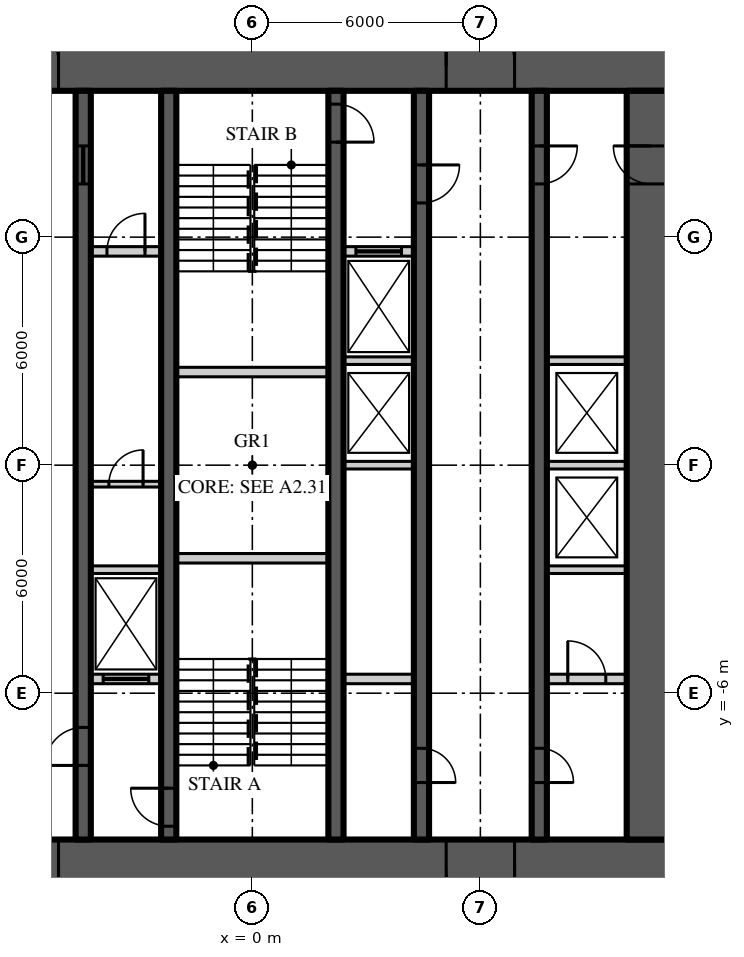
"""IFC4 building model, lengths in metres.
Left out: names, types, materials, properties, quantities, classifications, styles, units other than length and angle.
Written with IfcOpenShell. Run it as: python <this file> out.ifc"""

import sys

from ifc_helpers import new_model, si_unit, direction, frame, frame_2d, origin, place, context, subcontext, project, spatial, rectangle, extrude, element, fill, save


model = new_model("IFC4")
c1 = context("Model", 3, precision=1e-05, world=origin(), true_north=direction((0.0, 1.0)))
c2 = subcontext(c1, "Body", "Model", "MODEL_VIEW")
j1 = project(units=[si_unit("LENGTHUNIT", "METRE"), si_unit("PLANEANGLEUNIT", "RADIAN")], contexts=[c1])
p1 = place(None, origin())
s1 = spatial("IfcSite", under=j1, at=p1, CompositionType="ELEMENT")
p2 = place(p1, origin())
s2 = spatial("IfcBuilding", under=s1, at=p2, CompositionType="ELEMENT")
p3 = place(p2, frame((0.0, 0.0, 232.2)))
s3 = spatial("IfcBuildingStorey", under=s2, at=p3, CompositionType="ELEMENT", Elevation=232.2)
p4 = place(p3, frame((-11.15, 10.5, 0.0), z_axis=(0.0, 0.0, 1.0), x_axis=(1.0, 0.0, 0.0)))
e1 = element("IfcWall", 1, at=p4, inside=s3, PredefinedType="SHEAR", context=c2, shape_type="SweptSolid", body=[
    extrude(rectangle(XDim=22.3, YDim=1.3, at=frame_2d((11.15, 0.0))), origin(), (0.0, 0.0, 1.0), 3.9),
])
p5 = place(p4, frame((4.25, 0.0, 0.0)))
e2 = element("IfcOpeningElement", 2, at=p5, cuts=e1, PredefinedType="OPENING", context=c2, shape_type="SweptSolid", body=[
    extrude(rectangle(XDim=1.8, YDim=2.2, at=frame_2d((0.9, 1.1))), frame((0.0, 0.66, 0.0), z_axis=(0.0, -1.0, 0.0), x_axis=(1.0, 0.0, 0.0)), (0.0, 0.0, 1.0), 1.32),
])
p6 = place(p4, frame((16.25, 0.0, 0.0)))
e3 = element("IfcOpeningElement", 3, at=p6, cuts=e1, PredefinedType="OPENING", context=c2, shape_type="SweptSolid", body=[
    extrude(rectangle(XDim=1.8, YDim=2.2, at=frame_2d((0.9, 1.1))), frame((0.0, 0.66, 0.0), z_axis=(0.0, -1.0, 0.0), x_axis=(1.0, 0.0, 0.0)), (0.0, 0.0, 1.0), 1.32),
])
p7 = place(p3, frame((11.15, -10.5, 0.0), z_axis=(0.0, 0.0, 1.0), x_axis=(-1.0, 0.0, 0.0)))
e4 = element("IfcWall", 4, at=p7, inside=s3, PredefinedType="SHEAR", context=c2, shape_type="SweptSolid", body=[
    extrude(rectangle(XDim=22.3, YDim=1.3, at=frame_2d((11.15, 0.0))), origin(), (0.0, 0.0, 1.0), 3.9),
])
p8 = place(p7, frame((16.25, 0.0, 0.0)))
e5 = element("IfcOpeningElement", 5, at=p8, cuts=e4, PredefinedType="OPENING", context=c2, shape_type="SweptSolid", body=[
    extrude(rectangle(XDim=1.8, YDim=2.2, at=frame_2d((0.9, 1.1))), frame((0.0, 0.66, 0.0), z_axis=(0.0, -1.0, 0.0), x_axis=(1.0, 0.0, 0.0)), (0.0, 0.0, 1.0), 1.32),
])
p9 = place(p7, frame((4.25, 0.0, 0.0)))
e6 = element("IfcOpeningElement", 6, at=p9, cuts=e4, PredefinedType="OPENING", context=c2, shape_type="SweptSolid", body=[
    extrude(rectangle(XDim=1.8, YDim=2.2, at=frame_2d((0.9, 1.1))), frame((0.0, 0.66, 0.0), z_axis=(0.0, -1.0, 0.0), x_axis=(1.0, 0.0, 0.0)), (0.0, 0.0, 1.0), 1.32),
])
p10 = place(p3, frame((10.5, -9.85, 0.0), z_axis=(0.0, 0.0, 1.0), x_axis=(0.0, 1.0, 0.0)))
e7 = element("IfcWall", 7, at=p10, inside=s3, PredefinedType="SHEAR", context=c2, shape_type="SweptSolid", body=[
    extrude(rectangle(XDim=19.7, YDim=1.3, at=frame_2d((9.85, 0.0))), origin(), (0.0, 0.0, 1.0), 3.9),
])
p11 = place(p10, frame((17.25, 0.0, 0.0)))
e8 = element("IfcOpeningElement", 8, at=p11, cuts=e7, PredefinedType="OPENING", context=c2, shape_type="SweptSolid", body=[
    extrude(rectangle(XDim=1.0, YDim=2.2, at=frame_2d((0.5, 1.1))), frame((0.0, 0.66, 0.0), z_axis=(0.0, -1.0, 0.0), x_axis=(1.0, 0.0, 0.0)), (0.0, 0.0, 1.0), 1.32),
])
p12 = place(p3, frame((7.55, 9.85, 0.0), z_axis=(0.0, 0.0, 1.0), x_axis=(0.0, -1.0, 0.0)))
e9 = element("IfcWall", 9, at=p12, inside=s3, PredefinedType="SHEAR", context=c2, shape_type="SweptSolid", body=[
    extrude(rectangle(XDim=19.7, YDim=0.4, at=frame_2d((9.85, 0.0))), origin(), (0.0, 0.0, 1.0), 3.9),
])
p13 = place(p12, frame((1.45, 0.0, 0.0)))
e10 = element("IfcOpeningElement", 10, at=p13, cuts=e9, PredefinedType="OPENING", context=c2, shape_type="SweptSolid", body=[
    extrude(rectangle(XDim=1.0, YDim=2.2, at=frame_2d((0.5, 1.1))), frame((0.0, 0.21, 0.0), z_axis=(0.0, -1.0, 0.0), x_axis=(1.0, 0.0, 0.0)), (0.0, 0.0, 1.0), 0.42),
])
p14 = place(p12, frame((17.3, 0.0, 0.0)))
e11 = element("IfcOpeningElement", 11, at=p14, cuts=e9, PredefinedType="OPENING", context=c2, shape_type="SweptSolid", body=[
    extrude(rectangle(XDim=0.9, YDim=2.1, at=frame_2d((0.45, 1.05))), frame((0.0, 0.21, 0.0), z_axis=(0.0, -1.0, 0.0), x_axis=(1.0, 0.0, 0.0)), (0.0, 0.0, 1.0), 0.42),
])
p15 = place(p3, frame((-4.45, -9.85, 0.0), z_axis=(0.0, 0.0, 1.0), x_axis=(0.0, 1.0, 0.0)))
e12 = element("IfcWall", 12, at=p15, inside=s3, PredefinedType="SHEAR", context=c2, shape_type="SweptSolid", body=[
    extrude(rectangle(XDim=19.7, YDim=0.4, at=frame_2d((9.85, 0.0))), origin(), (0.0, 0.0, 1.0), 3.9),
])
p16 = place(p15, frame((1.95, 0.0, 0.0)))
e13 = element("IfcOpeningElement", 13, at=p16, cuts=e12, PredefinedType="OPENING", context=c2, shape_type="SweptSolid", body=[
    extrude(rectangle(XDim=1.0, YDim=2.2, at=frame_2d((0.5, 1.1))), frame((0.0, 0.21, 0.0), z_axis=(0.0, -1.0, 0.0), x_axis=(1.0, 0.0, 0.0)), (0.0, 0.0, 1.0), 0.42),
])
p17 = place(p15, frame((17.25, 0.0, 0.0)))
e14 = element("IfcOpeningElement", 14, at=p17, cuts=e12, PredefinedType="OPENING", context=c2, shape_type="SweptSolid", body=[
    extrude(rectangle(XDim=1.0, YDim=2.1, at=frame_2d((0.5, 1.05))), frame((0.0, 0.21, 0.0), z_axis=(0.0, -1.0, 0.0), x_axis=(1.0, 0.0, 0.0)), (0.0, 0.0, 1.0), 0.42),
])
p18 = place(p3, frame((4.45, 9.85, 0.0), z_axis=(0.0, 0.0, 1.0), x_axis=(0.0, -1.0, 0.0)))
e15 = element("IfcWall", 15, at=p18, inside=s3, PredefinedType="SHEAR", context=c2, shape_type="SweptSolid", body=[
    extrude(rectangle(XDim=19.7, YDim=0.4, at=frame_2d((9.85, 0.0))), origin(), (0.0, 0.0, 1.0), 3.9),
])
p19 = place(p18, frame((1.95, 0.0, 0.0)))
e16 = element("IfcOpeningElement", 16, at=p19, cuts=e15, PredefinedType="OPENING", context=c2, shape_type="SweptSolid", body=[
    extrude(rectangle(XDim=1.0, YDim=2.2, at=frame_2d((0.5, 1.1))), frame((0.0, 0.21, 0.0), z_axis=(0.0, -1.0, 0.0), x_axis=(1.0, 0.0, 0.0)), (0.0, 0.0, 1.0), 0.42),
])
p20 = place(p18, frame((17.3, 0.0, 0.0)))
e17 = element("IfcOpeningElement", 17, at=p20, cuts=e15, PredefinedType="OPENING", context=c2, shape_type="SweptSolid", body=[
    extrude(rectangle(XDim=0.9, YDim=2.1, at=frame_2d((0.45, 1.05))), frame((0.0, 0.21, 0.0), z_axis=(0.0, -1.0, 0.0), x_axis=(1.0, 0.0, 0.0)), (0.0, 0.0, 1.0), 0.42),
])
p21 = place(p3, frame((-2.2, -9.85, 0.0), z_axis=(0.0, 0.0, 1.0), x_axis=(0.0, 1.0, 0.0)))
e18 = element("IfcWall", 18, at=p21, inside=s3, PredefinedType="SHEAR", context=c2, shape_type="SweptSolid", body=[
    extrude(rectangle(XDim=19.7, YDim=0.4, at=frame_2d((9.85, 0.0))), origin(), (0.0, 0.0, 1.0), 3.9),
])
p22 = place(p21, frame((0.35, 0.0, 0.0)))
e19 = element("IfcOpeningElement", 19, at=p22, cuts=e18, PredefinedType="OPENING", context=c2, shape_type="SweptSolid", body=[
    extrude(rectangle(XDim=1.0, YDim=2.2, at=frame_2d((0.5, 1.1))), frame((0.0, 0.21, 0.0), z_axis=(0.0, -1.0, 0.0), x_axis=(1.0, 0.0, 0.0)), (0.0, 0.0, 1.0), 0.42),
])
p23 = place(p3, frame((2.2, 9.85, 0.0), z_axis=(0.0, 0.0, 1.0), x_axis=(0.0, -1.0, 0.0)))
e20 = element("IfcWall", 20, at=p23, inside=s3, PredefinedType="SHEAR", context=c2, shape_type="SweptSolid", body=[
    extrude(rectangle(XDim=19.7, YDim=0.4, at=frame_2d((9.85, 0.0))), origin(), (0.0, 0.0, 1.0), 3.9),
])
p24 = place(p23, frame((0.35, 0.0, 0.0)))
e21 = element("IfcOpeningElement", 21, at=p24, cuts=e20, PredefinedType="OPENING", context=c2, shape_type="SweptSolid", body=[
    extrude(rectangle(XDim=1.0, YDim=2.2, at=frame_2d((0.5, 1.1))), frame((0.0, 0.21, 0.0), z_axis=(0.0, -1.0, 0.0), x_axis=(1.0, 0.0, 0.0)), (0.0, 0.0, 1.0), 0.42),
])
p25 = place(p3, frame((-4.25, 5.625, 0.0), z_axis=(0.0, 0.0, 1.0), x_axis=(1.0, 0.0, 0.0)))
e22 = element("IfcWall", 22, at=p25, inside=s3, PredefinedType="SOLIDWALL", context=c2, shape_type="SweptSolid", body=[
    extrude(rectangle(XDim=1.85, YDim=0.25, at=frame_2d((0.925, 0.0))), origin(), (0.0, 0.0, 1.0), 3.7),
])
p26 = place(p25, frame((0.425, 0.0, 0.0)))
e23 = element("IfcOpeningElement", 23, at=p26, cuts=e22, PredefinedType="OPENING", context=c2, shape_type="SweptSolid", body=[
    extrude(rectangle(XDim=1.0, YDim=2.2, at=frame_2d((0.5, 1.1))), frame((0.0, 0.135, 0.0), z_axis=(0.0, -1.0, 0.0), x_axis=(1.0, 0.0, 0.0)), (0.0, 0.0, 1.0), 0.27),
])
p27 = place(p3, frame((2.4, 5.625, 0.0), z_axis=(0.0, 0.0, 1.0), x_axis=(1.0, 0.0, 0.0)))
e24 = element("IfcWall", 24, at=p27, inside=s3, PredefinedType="SOLIDWALL", context=c2, shape_type="SweptSolid", body=[
    extrude(rectangle(XDim=1.85, YDim=0.25, at=frame_2d((0.925, 0.0))), origin(), (0.0, 0.0, 1.0), 3.7),
])
p28 = place(p27, frame((0.325, 0.0, 0.0)))
e25 = element("IfcOpeningElement", 25, at=p28, cuts=e24, PredefinedType="OPENING", context=c2, shape_type="SweptSolid", body=[
    extrude(rectangle(XDim=1.2, YDim=2.2, at=frame_2d((0.6, 1.1))), frame((0.0, 0.135, 0.0), z_axis=(0.0, -1.0, 0.0), x_axis=(1.0, 0.0, 0.0)), (0.0, 0.0, 1.0), 0.27),
])
p29 = place(p3, frame((-4.25, -5.625, 0.0), z_axis=(0.0, 0.0, 1.0), x_axis=(1.0, 0.0, 0.0)))
e26 = element("IfcWall", 26, at=p29, inside=s3, PredefinedType="SOLIDWALL", context=c2, shape_type="SweptSolid", body=[
    extrude(rectangle(XDim=1.85, YDim=0.25, at=frame_2d((0.925, 0.0))), origin(), (0.0, 0.0, 1.0), 3.7),
])
p30 = place(p29, frame((0.325, 0.0, 0.0)))
e27 = element("IfcOpeningElement", 27, at=p30, cuts=e26, PredefinedType="OPENING", context=c2, shape_type="SweptSolid", body=[
    extrude(rectangle(XDim=1.2, YDim=2.2, at=frame_2d((0.6, 1.1))), frame((0.0, 0.135, 0.0), z_axis=(0.0, -1.0, 0.0), x_axis=(1.0, 0.0, 0.0)), (0.0, 0.0, 1.0), 0.27),
])
p31 = place(p3, frame((2.4, -5.625, 0.0), z_axis=(0.0, 0.0, 1.0), x_axis=(1.0, 0.0, 0.0)))
e28 = element("IfcWall", 28, at=p31, inside=s3, PredefinedType="SOLIDWALL", context=c2, shape_type="SweptSolid", body=[
    extrude(rectangle(XDim=1.85, YDim=0.25, at=frame_2d((0.925, 0.0))), origin(), (0.0, 0.0, 1.0), 3.7),
])
p32 = place(p3, frame((7.75, -5.625, 0.0), z_axis=(0.0, 0.0, 1.0), x_axis=(1.0, 0.0, 0.0)))
e29 = element("IfcWall", 29, at=p32, inside=s3, PredefinedType="SOLIDWALL", context=c2, shape_type="SweptSolid", body=[
    extrude(rectangle(XDim=2.1, YDim=0.25, at=frame_2d((1.05, 0.0))), origin(), (0.0, 0.0, 1.0), 3.7),
])
p33 = place(p32, frame((0.55, 0.0, 0.0)))
e30 = element("IfcOpeningElement", 30, at=p33, cuts=e29, PredefinedType="OPENING", context=c2, shape_type="SweptSolid", body=[
    extrude(rectangle(XDim=1.0, YDim=2.2, at=frame_2d((0.5, 1.1))), frame((0.0, 0.135, 0.0), z_axis=(0.0, -1.0, 0.0), x_axis=(1.0, 0.0, 0.0)), (0.0, 0.0, 1.0), 0.27),
])
for number, where, z_axis, x_axis in (
    (31, (-2.0, -2.45, 0.0), (0.0, 0.0, 1.0), (1.0, 0.0, 0.0)),
    (32, (-2.0, 2.45, 0.0), (0.0, 0.0, 1.0), (1.0, 0.0, 0.0)),
):
    element("IfcWall", number, at=place(p3, frame(where, z_axis=z_axis, x_axis=x_axis)), inside=s3, PredefinedType="SOLIDWALL", context=c2, shape_type="SweptSolid", body=[
        extrude(rectangle(XDim=4.0, YDim=0.25, at=frame_2d((2.0, 0.0))), origin(), (0.0, 0.0, 1.0), 3.7),
    ])
p34 = place(p3, frame((-4.25, -2.75, 0.0), z_axis=(0.0, 0.0, 1.0), x_axis=(1.0, 0.0, 0.0)))
e33 = element("IfcWall", 33, at=p34, inside=s3, PredefinedType="SOLIDWALL", context=c2, shape_type="SweptSolid", body=[
    extrude(rectangle(XDim=1.85, YDim=0.2, at=frame_2d((0.925, 0.0))), origin(), (0.0, 0.0, 1.0), 3.7),
])
p35 = place(p3, frame((7.75, -2.75, 0.0), z_axis=(0.0, 0.0, 1.0), x_axis=(1.0, 0.0, 0.0)))
e34 = element("IfcWall", 34, at=p35, inside=s3, PredefinedType="SOLIDWALL", context=c2, shape_type="SweptSolid", body=[
    extrude(rectangle(XDim=2.1, YDim=0.2, at=frame_2d((1.05, 0.0))), origin(), (0.0, 0.0, 1.0), 3.7),
])
p36 = place(p3, frame((2.4, 0.0, 0.0), z_axis=(0.0, 0.0, 1.0), x_axis=(1.0, 0.0, 0.0)))
e35 = element("IfcWall", 35, at=p36, inside=s3, PredefinedType="SOLIDWALL", context=c2, shape_type="SweptSolid", body=[
    extrude(rectangle(XDim=1.85, YDim=0.2, at=frame_2d((0.925, 0.0))), origin(), (0.0, 0.0, 1.0), 3.7),
])
p37 = place(p3, frame((7.75, 0.0, 0.0), z_axis=(0.0, 0.0, 1.0), x_axis=(1.0, 0.0, 0.0)))
e36 = element("IfcWall", 36, at=p37, inside=s3, PredefinedType="SOLIDWALL", context=c2, shape_type="SweptSolid", body=[
    extrude(rectangle(XDim=2.1, YDim=0.2, at=frame_2d((1.05, 0.0))), origin(), (0.0, 0.0, 1.0), 3.7),
])
p38 = place(p3, frame((2.4, 2.75, 0.0), z_axis=(0.0, 0.0, 1.0), x_axis=(1.0, 0.0, 0.0)))
e37 = element("IfcWall", 37, at=p38, inside=s3, PredefinedType="SOLIDWALL", context=c2, shape_type="SweptSolid", body=[
    extrude(rectangle(XDim=1.85, YDim=0.2, at=frame_2d((0.925, 0.0))), origin(), (0.0, 0.0, 1.0), 3.7),
])
p39 = place(p3, frame((7.75, 2.75, 0.0), z_axis=(0.0, 0.0, 1.0), x_axis=(1.0, 0.0, 0.0)))
e38 = element("IfcWall", 38, at=p39, inside=s3, PredefinedType="SOLIDWALL", context=c2, shape_type="SweptSolid", body=[
    extrude(rectangle(XDim=2.1, YDim=0.2, at=frame_2d((1.05, 0.0))), origin(), (0.0, 0.0, 1.0), 3.7),
])
p40 = place(p3, frame((-4.25, -0.5, 0.0), z_axis=(0.0, 0.0, 1.0), x_axis=(1.0, 0.0, 0.0)))
e39 = element("IfcWall", 39, at=p40, inside=s3, PredefinedType="SOLIDWALL", context=c2, shape_type="SweptSolid", body=[
    extrude(rectangle(XDim=1.85, YDim=0.15, at=frame_2d((0.925, 0.0))), origin(), (0.0, 0.0, 1.0), 3.77),
])
p41 = place(p40, frame((0.475, 0.0, 0.0)))
e40 = element("IfcOpeningElement", 40, at=p41, cuts=e39, PredefinedType="OPENING", context=c2, shape_type="SweptSolid", body=[
    extrude(rectangle(XDim=0.9, YDim=2.1, at=frame_2d((0.45, 1.05))), frame((0.0, 0.085, 0.0), z_axis=(0.0, -1.0, 0.0), x_axis=(1.0, 0.0, 0.0)), (0.0, 0.0, 1.0), 0.17),
])
p42 = place(p5, origin())
e41 = element("IfcDoor", 41, at=p42, inside=s3, OperationType="DOUBLE_DOOR_DOUBLE_SWING", PredefinedType="DOOR", context=c2, shape_type="SweptSolid", body=[
    extrude(rectangle(XDim=1.8, YDim=2.2, at=frame_2d((0.9, 1.1))), frame((0.0, 0.025, 0.0), z_axis=(0.0, -1.0, 0.0), x_axis=(1.0, 0.0, 0.0)), (0.0, 0.0, 1.0), 0.05),
])
fill(e2, e41)
p43 = place(p8, origin())
e42 = element("IfcDoor", 42, at=p43, inside=s3, OperationType="DOUBLE_DOOR_DOUBLE_SWING", PredefinedType="DOOR", context=c2, shape_type="SweptSolid", body=[
    extrude(rectangle(XDim=1.8, YDim=2.2, at=frame_2d((0.9, 1.1))), frame((0.0, 0.025, 0.0), z_axis=(0.0, -1.0, 0.0), x_axis=(1.0, 0.0, 0.0)), (0.0, 0.0, 1.0), 0.05),
])
fill(e5, e42)
p44 = place(p6, origin())
e43 = element("IfcDoor", 43, at=p44, inside=s3, OperationType="DOUBLE_DOOR_DOUBLE_SWING", PredefinedType="DOOR", context=c2, shape_type="SweptSolid", body=[
    extrude(rectangle(XDim=1.8, YDim=2.2, at=frame_2d((0.9, 1.1))), frame((0.0, 0.025, 0.0), z_axis=(0.0, -1.0, 0.0), x_axis=(1.0, 0.0, 0.0)), (0.0, 0.0, 1.0), 0.05),
])
fill(e3, e43)
p45 = place(p9, origin())
e44 = element("IfcDoor", 44, at=p45, inside=s3, OperationType="DOUBLE_DOOR_DOUBLE_SWING", PredefinedType="DOOR", context=c2, shape_type="SweptSolid", body=[
    extrude(rectangle(XDim=1.8, YDim=2.2, at=frame_2d((0.9, 1.1))), frame((0.0, 0.025, 0.0), z_axis=(0.0, -1.0, 0.0), x_axis=(1.0, 0.0, 0.0)), (0.0, 0.0, 1.0), 0.05),
])
fill(e6, e44)
p46 = place(p13, origin())
e45 = element("IfcDoor", 45, at=p46, inside=s3, OperationType="SINGLE_SWING_LEFT", PredefinedType="DOOR", context=c2, shape_type="SweptSolid", body=[
    extrude(rectangle(XDim=1.0, YDim=2.2, at=frame_2d((0.5, 1.1))), frame((0.0, 0.025, 0.0), z_axis=(0.0, -1.0, 0.0), x_axis=(1.0, 0.0, 0.0)), (0.0, 0.0, 1.0), 0.05),
])
fill(e10, e45)
p47 = place(p11, origin())
e46 = element("IfcDoor", 46, at=p47, inside=s3, OperationType="SINGLE_SWING_RIGHT", PredefinedType="DOOR", context=c2, shape_type="SweptSolid", body=[
    extrude(rectangle(XDim=1.0, YDim=2.2, at=frame_2d((0.5, 1.1))), frame((0.0, 0.025, 0.0), z_axis=(0.0, -1.0, 0.0), x_axis=(1.0, 0.0, 0.0)), (0.0, 0.0, 1.0), 0.05),
])
fill(e8, e46)
p48 = place(p16, origin())
e47 = element("IfcDoor", 47, at=p48, inside=s3, OperationType="SINGLE_SWING_LEFT", PredefinedType="DOOR", context=c2, shape_type="SweptSolid", body=[
    extrude(rectangle(XDim=1.0, YDim=2.2, at=frame_2d((0.5, 1.1))), frame((0.0, 0.025, 0.0), z_axis=(0.0, -1.0, 0.0), x_axis=(1.0, 0.0, 0.0)), (0.0, 0.0, 1.0), 0.05),
])
fill(e13, e47)
p49 = place(p22, origin())
e48 = element("IfcDoor", 48, at=p49, inside=s3, OperationType="SINGLE_SWING_RIGHT", PredefinedType="DOOR", context=c2, shape_type="SweptSolid", body=[
    extrude(rectangle(XDim=1.0, YDim=2.2, at=frame_2d((0.5, 1.1))), frame((0.0, 0.025, 0.0), z_axis=(0.0, -1.0, 0.0), x_axis=(1.0, 0.0, 0.0)), (0.0, 0.0, 1.0), 0.05),
])
fill(e19, e48)
p50 = place(p19, origin())
e49 = element("IfcDoor", 49, at=p50, inside=s3, OperationType="SINGLE_SWING_LEFT", PredefinedType="DOOR", context=c2, shape_type="SweptSolid", body=[
    extrude(rectangle(XDim=1.0, YDim=2.2, at=frame_2d((0.5, 1.1))), frame((0.0, 0.025, 0.0), z_axis=(0.0, -1.0, 0.0), x_axis=(1.0, 0.0, 0.0)), (0.0, 0.0, 1.0), 0.05),
])
fill(e16, e49)
p51 = place(p24, origin())
e50 = element("IfcDoor", 50, at=p51, inside=s3, OperationType="SINGLE_SWING_RIGHT", PredefinedType="DOOR", context=c2, shape_type="SweptSolid", body=[
    extrude(rectangle(XDim=1.0, YDim=2.2, at=frame_2d((0.5, 1.1))), frame((0.0, 0.025, 0.0), z_axis=(0.0, -1.0, 0.0), x_axis=(1.0, 0.0, 0.0)), (0.0, 0.0, 1.0), 0.05),
])
fill(e21, e50)
p52 = place(p17, origin())
e51 = element("IfcDoor", 51, at=p52, inside=s3, OperationType="SLIDING_TO_LEFT", PredefinedType="DOOR", context=c2, shape_type="SweptSolid", body=[
    extrude(rectangle(XDim=1.0, YDim=2.1, at=frame_2d((0.5, 1.05))), frame((0.0, 0.025, 0.0), z_axis=(0.0, -1.0, 0.0), x_axis=(1.0, 0.0, 0.0)), (0.0, 0.0, 1.0), 0.05),
])
fill(e14, e51)
p53 = place(p14, origin())
e52 = element("IfcDoor", 52, at=p53, inside=s3, OperationType="SINGLE_SWING_RIGHT", PredefinedType="DOOR", context=c2, shape_type="SweptSolid", body=[
    extrude(rectangle(XDim=0.9, YDim=2.1, at=frame_2d((0.45, 1.05))), frame((0.0, 0.025, 0.0), z_axis=(0.0, -1.0, 0.0), x_axis=(1.0, 0.0, 0.0)), (0.0, 0.0, 1.0), 0.05),
])
fill(e11, e52)
p54 = place(p20, origin())
e53 = element("IfcDoor", 53, at=p54, inside=s3, OperationType="SINGLE_SWING_RIGHT", PredefinedType="DOOR", context=c2, shape_type="SweptSolid", body=[
    extrude(rectangle(XDim=0.9, YDim=2.1, at=frame_2d((0.45, 1.05))), frame((0.0, 0.025, 0.0), z_axis=(0.0, -1.0, 0.0), x_axis=(1.0, 0.0, 0.0)), (0.0, 0.0, 1.0), 0.05),
])
fill(e17, e53)
p55 = place(p30, origin())
e54 = element("IfcDoor", 54, at=p55, inside=s3, OperationType="SLIDING_TO_LEFT", PredefinedType="DOOR", context=c2, shape_type="SweptSolid", body=[
    extrude(rectangle(XDim=1.2, YDim=2.2, at=frame_2d((0.6, 1.1))), frame((0.0, 0.025, 0.0), z_axis=(0.0, -1.0, 0.0), x_axis=(1.0, 0.0, 0.0)), (0.0, 0.0, 1.0), 0.05),
])
fill(e27, e54)
p56 = place(p28, origin())
e55 = element("IfcDoor", 55, at=p56, inside=s3, OperationType="SLIDING_TO_LEFT", PredefinedType="DOOR", context=c2, shape_type="SweptSolid", body=[
    extrude(rectangle(XDim=1.2, YDim=2.2, at=frame_2d((0.6, 1.1))), frame((0.0, 0.025, 0.0), z_axis=(0.0, -1.0, 0.0), x_axis=(1.0, 0.0, 0.0)), (0.0, 0.0, 1.0), 0.05),
])
fill(e25, e55)
p57 = place(p41, origin())
e56 = element("IfcDoor", 56, at=p57, inside=s3, OperationType="SINGLE_SWING_RIGHT", PredefinedType="DOOR", context=c2, shape_type="SweptSolid", body=[
    extrude(rectangle(XDim=0.9, YDim=2.1, at=frame_2d((0.45, 1.05))), frame((0.0, 0.025, 0.0), z_axis=(0.0, -1.0, 0.0), x_axis=(1.0, 0.0, 0.0)), (0.0, 0.0, 1.0), 0.05),
])
fill(e40, e56)
p58 = place(p26, origin())
e57 = element("IfcDoor", 57, at=p58, inside=s3, OperationType="SINGLE_SWING_RIGHT", PredefinedType="DOOR", context=c2, shape_type="SweptSolid", body=[
    extrude(rectangle(XDim=1.0, YDim=2.2, at=frame_2d((0.5, 1.1))), frame((0.0, 0.025, 0.0), z_axis=(0.0, -1.0, 0.0), x_axis=(1.0, 0.0, 0.0)), (0.0, 0.0, 1.0), 0.05),
])
fill(e23, e57)
p59 = place(p33, origin())
e58 = element("IfcDoor", 58, at=p59, inside=s3, OperationType="SINGLE_SWING_LEFT", PredefinedType="DOOR", context=c2, shape_type="SweptSolid", body=[
    extrude(rectangle(XDim=1.0, YDim=2.2, at=frame_2d((0.5, 1.1))), frame((0.0, 0.025, 0.0), z_axis=(0.0, -1.0, 0.0), x_axis=(1.0, 0.0, 0.0)), (0.0, 0.0, 1.0), 0.05),
])
fill(e30, e58)
save(model, sys.argv[1])
